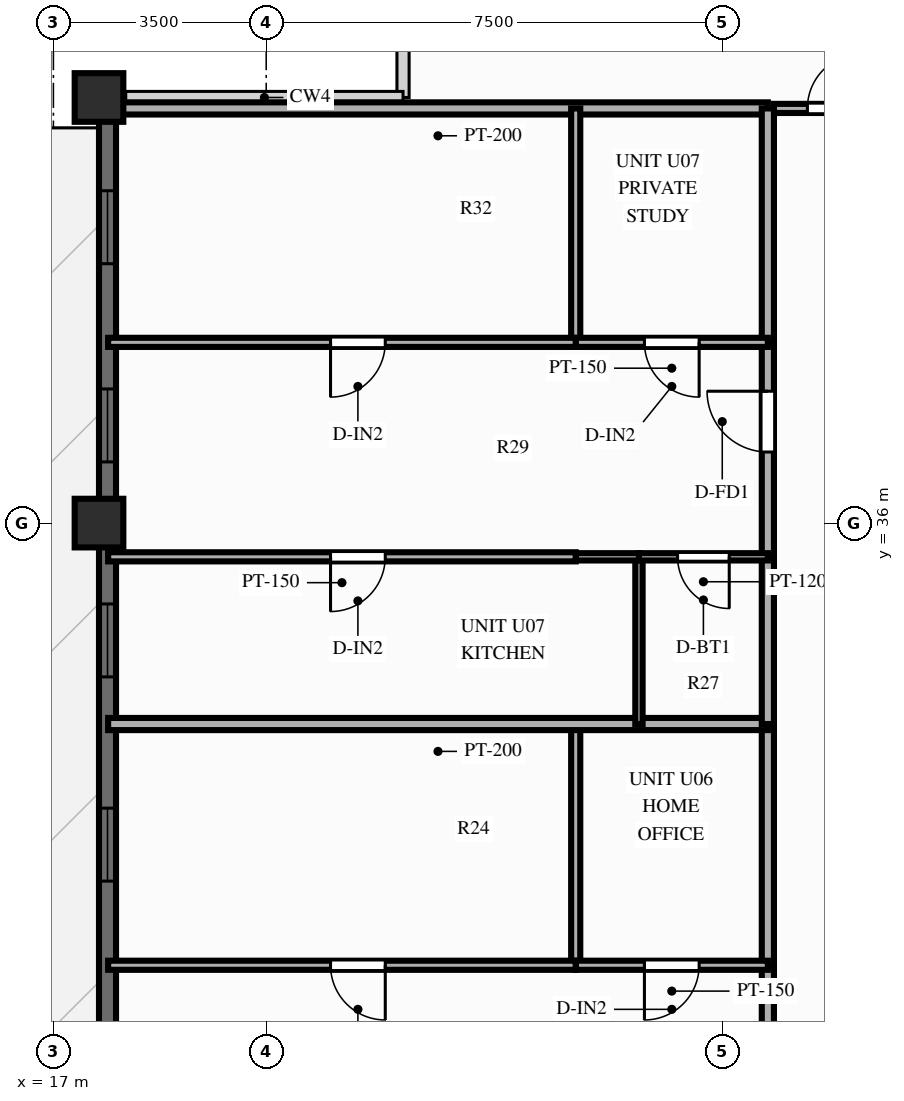
"""IFC4 building model, lengths in metres.
Left out: names, types, materials, properties, quantities, classifications, styles, units other than length and angle.
Written with IfcOpenShell. Run it as: python <this file> out.ifc"""

import sys

from ifc_helpers import new_model, si_unit, direction, frame, frame_2d, origin, origin_2d, place, context, subcontext, project, spatial, rectangle, extrude, source, transform, mapped, element, fill, save


model = new_model("IFC4")
c1 = context("Model", 3, precision=1e-05, world=origin(), true_north=direction((0.0, 1.0)))
c2 = subcontext(c1, "Body", "Model", "MODEL_VIEW")
j1 = project(units=[si_unit("LENGTHUNIT", "METRE"), si_unit("PLANEANGLEUNIT", "RADIAN")], contexts=[c1])
p1 = place(None, origin())
s1 = spatial("IfcSite", under=j1, at=p1, CompositionType="ELEMENT")
p2 = place(p1, origin())
s2 = spatial("IfcBuilding", under=s1, at=p2, CompositionType="ELEMENT")
p3 = place(p2, frame((0.0, 0.0, 176.8)))
s3 = spatial("IfcBuildingStorey", under=s2, at=p3, CompositionType="ELEMENT", Elevation=176.8)
m1 = source(origin(), c2, "Body", "SweptSolid", [
    extrude(rectangle(XDim=0.8, YDim=0.8, at=origin_2d()), origin(), (0.0, 0.0, 1.0), 3.0),
])
for number, where, z_axis, x_axis in (
    (1, (17.75, 43.0, 0.0), (0.0, 0.0, 1.0), (1.0, 0.0, 0.0)),
    (2, (17.75, 36.0, 0.0), (0.0, 0.0, 1.0), (1.0, 0.0, 0.0)),
):
    element("IfcColumn", number, at=place(p3, frame(where, z_axis=z_axis, x_axis=x_axis)), inside=s3, PredefinedType="COLUMN", context=c2, shape_type="MappedRepresentation", body=[
        mapped(m1, transform((0.0, 0.0, 0.0), scale=1.0)),
    ])
p4 = place(p3, frame((17.89, 11.0, 0.0), z_axis=(0.0, 0.0, 1.0), x_axis=(0.0, 1.0, 0.0)))
e3 = element("IfcWall", 3, at=p4, inside=s3, PredefinedType="SOLIDWALL", context=c2, shape_type="SweptSolid", body=[
    extrude(rectangle(XDim=32.0, YDim=0.28, at=frame_2d((16.0, 0.0))), origin(), (0.0, 0.0, 1.0), 2.28),
])
p5 = place(p4, frame((0.985, 0.0, 0.25)))
e4 = element("IfcOpeningElement", 4, at=p5, cuts=e3, PredefinedType="OPENING", context=c2, shape_type="SweptSolid", body=[
    extrude(rectangle(XDim=1.2, YDim=1.5, at=frame_2d((0.6, 0.75))), frame((0.0, 0.152, 0.0), z_axis=(0.0, -1.0, 0.0), x_axis=(1.0, 0.0, 0.0)), (0.0, 0.0, 1.0), 0.304),
])
p6 = place(p4, frame((4.245, 0.0, 0.25)))
e5 = element("IfcOpeningElement", 5, at=p6, cuts=e3, PredefinedType="OPENING", context=c2, shape_type="SweptSolid", body=[
    extrude(rectangle(XDim=1.2, YDim=1.5, at=frame_2d((0.6, 0.75))), frame((0.0, 0.152, 0.0), z_axis=(0.0, -1.0, 0.0), x_axis=(1.0, 0.0, 0.0)), (0.0, 0.0, 1.0), 0.304),
])
p7 = place(p4, frame((8.667, 0.0, 0.25)))
e6 = element("IfcOpeningElement", 6, at=p7, cuts=e3, PredefinedType="OPENING", context=c2, shape_type="SweptSolid", body=[
    extrude(rectangle(XDim=1.2, YDim=1.5, at=frame_2d((0.6, 0.75))), frame((0.0, 0.152, 0.0), z_axis=(0.0, -1.0, 0.0), x_axis=(1.0, 0.0, 0.0)), (0.0, 0.0, 1.0), 0.304),
])
p8 = place(p4, frame((12.029, 0.0, 0.25)))
e7 = element("IfcOpeningElement", 7, at=p8, cuts=e3, PredefinedType="OPENING", context=c2, shape_type="SweptSolid", body=[
    extrude(rectangle(XDim=1.2, YDim=1.5, at=frame_2d((0.6, 0.75))), frame((0.0, 0.152, 0.0), z_axis=(0.0, -1.0, 0.0), x_axis=(1.0, 0.0, 0.0)), (0.0, 0.0, 1.0), 0.304),
])
p9 = place(p4, frame((15.066, 0.0, 0.0)))
e8 = element("IfcOpeningElement", 8, at=p9, cuts=e3, PredefinedType="OPENING", context=c2, shape_type="SweptSolid", body=[
    extrude(rectangle(XDim=1.6, YDim=2.15, at=frame_2d((0.8, 1.075))), frame((0.0, 0.152, 0.0), z_axis=(0.0, -1.0, 0.0), x_axis=(1.0, 0.0, 0.0)), (0.0, 0.0, 1.0), 0.304),
])
p10 = place(p4, frame((19.111, 0.0, 0.25)))
e9 = element("IfcOpeningElement", 9, at=p10, cuts=e3, PredefinedType="OPENING", context=c2, shape_type="SweptSolid", body=[
    extrude(rectangle(XDim=1.2, YDim=1.5, at=frame_2d((0.6, 0.75))), frame((0.0, 0.152, 0.0), z_axis=(0.0, -1.0, 0.0), x_axis=(1.0, 0.0, 0.0)), (0.0, 0.0, 1.0), 0.304),
])
p11 = place(p4, frame((22.47, 0.0, 0.25)))
e10 = element("IfcOpeningElement", 10, at=p11, cuts=e3, PredefinedType="OPENING", context=c2, shape_type="SweptSolid", body=[
    extrude(rectangle(XDim=1.2, YDim=1.5, at=frame_2d((0.6, 0.75))), frame((0.0, 0.152, 0.0), z_axis=(0.0, -1.0, 0.0), x_axis=(1.0, 0.0, 0.0)), (0.0, 0.0, 1.0), 0.304),
])
p12 = place(p4, frame((26.006, 0.0, 0.25)))
e11 = element("IfcOpeningElement", 11, at=p12, cuts=e3, PredefinedType="OPENING", context=c2, shape_type="SweptSolid", body=[
    extrude(rectangle(XDim=1.2, YDim=1.5, at=frame_2d((0.6, 0.75))), frame((0.0, 0.152, 0.0), z_axis=(0.0, -1.0, 0.0), x_axis=(1.0, 0.0, 0.0)), (0.0, 0.0, 1.0), 0.304),
])
p13 = place(p4, frame((29.266, 0.0, 0.25)))
e12 = element("IfcOpeningElement", 12, at=p13, cuts=e3, PredefinedType="OPENING", context=c2, shape_type="SweptSolid", body=[
    extrude(rectangle(XDim=1.2, YDim=1.5, at=frame_2d((0.6, 0.75))), frame((0.0, 0.152, 0.0), z_axis=(0.0, -1.0, 0.0), x_axis=(1.0, 0.0, 0.0)), (0.0, 0.0, 1.0), 0.304),
])
p14 = place(p3, frame((28.85, 42.82, 0.0), z_axis=(0.0, 0.0, 1.0), x_axis=(1.0, 0.0, 0.0)))
e13 = element("IfcWall", 13, at=p14, inside=s3, PredefinedType="PARTITIONING", context=c2, shape_type="SweptSolid", body=[
    extrude(rectangle(XDim=2.33, YDim=0.15, at=frame_2d((1.165, 0.0))), origin(), (0.0, 0.0, 1.0), 2.79),
])
p15 = place(p14, frame((0.55, 0.0, 0.0)))
e14 = element("IfcOpeningElement", 14, at=p15, cuts=e13, PredefinedType="OPENING", context=c2, shape_type="SweptSolid", body=[
    extrude(rectangle(XDim=0.9, YDim=2.1, at=frame_2d((0.45, 1.05))), frame((0.0, 0.087, 0.0), z_axis=(0.0, -1.0, 0.0), x_axis=(1.0, 0.0, 0.0)), (0.0, 0.0, 1.0), 0.174),
])
p16 = place(p3, frame((28.75, 42.82, 0.0), z_axis=(0.0, 0.0, 1.0), x_axis=(-1.0, 0.0, 0.0)))
e15 = element("IfcWall", 15, at=p16, inside=s3, PredefinedType="PARTITIONING", context=c2, shape_type="SweptSolid", body=[
    extrude(rectangle(XDim=10.85, YDim=0.2, at=frame_2d((5.425, 0.0))), origin(), (0.0, 0.0, 1.0), 2.79),
])
p17 = place(p3, frame((28.75, 25.004, 0.0), z_axis=(0.0, 0.0, 1.0), x_axis=(0.0, 1.0, 0.0)))
e16 = element("IfcWall", 16, at=p17, inside=s3, PredefinedType="PARTITIONING", context=c2, shape_type="SweptSolid", body=[
    extrude(rectangle(XDim=3.724, YDim=0.2, at=frame_2d((1.862, 0.0))), origin(), (0.0, 0.0, 1.0), 2.79),
])
p18 = place(p17, frame((1.362, 0.0, 0.0)))
e17 = element("IfcOpeningElement", 17, at=p18, cuts=e16, PredefinedType="OPENING", context=c2, shape_type="SweptSolid", body=[
    extrude(rectangle(XDim=1.0, YDim=2.15, at=frame_2d((0.5, 1.075))), frame((0.0, 0.112, 0.0), z_axis=(0.0, -1.0, 0.0), x_axis=(1.0, 0.0, 0.0)), (0.0, 0.0, 1.0), 0.224),
])
p19 = place(p3, frame((28.75, 28.728, 0.0), z_axis=(0.0, 0.0, 1.0), x_axis=(0.0, 1.0, 0.0)))
e18 = element("IfcWall", 18, at=p19, inside=s3, PredefinedType="PARTITIONING", context=c2, shape_type="SweptSolid", body=[
    extrude(rectangle(XDim=3.968, YDim=0.2, at=frame_2d((1.984, 0.0))), origin(), (0.0, 0.0, 1.0), 2.79),
])
p20 = place(p3, frame((25.59, 28.728, 0.0), z_axis=(0.0, 0.0, 1.0), x_axis=(0.0, 1.0, 0.0)))
e19 = element("IfcWall", 19, at=p20, inside=s3, PredefinedType="PARTITIONING", context=c2, shape_type="SweptSolid", body=[
    extrude(rectangle(XDim=3.968, YDim=0.15, at=frame_2d((1.984, 0.0))), origin(), (0.0, 0.0, 1.0), 2.79),
])
p21 = place(p3, frame((28.75, 28.728, 0.0), z_axis=(0.0, 0.0, 1.0), x_axis=(-1.0, 0.0, 0.0)))
e20 = element("IfcWall", 20, at=p21, inside=s3, PredefinedType="PARTITIONING", context=c2, shape_type="SweptSolid", body=[
    extrude(rectangle(XDim=3.16, YDim=0.15, at=frame_2d((1.58, 0.0))), origin(), (0.0, 0.0, 1.0), 2.79),
])
p22 = place(p21, frame((1.13, 0.0, 0.0)))
e21 = element("IfcOpeningElement", 21, at=p22, cuts=e20, PredefinedType="OPENING", context=c2, shape_type="SweptSolid", body=[
    extrude(rectangle(XDim=0.9, YDim=2.1, at=frame_2d((0.45, 1.05))), frame((0.0, 0.087, 0.0), z_axis=(0.0, -1.0, 0.0), x_axis=(1.0, 0.0, 0.0)), (0.0, 0.0, 1.0), 0.174),
])
p23 = place(p3, frame((25.59, 28.728, 0.0), z_axis=(0.0, 0.0, 1.0), x_axis=(-1.0, 0.0, 0.0)))
e22 = element("IfcWall", 22, at=p23, inside=s3, PredefinedType="PARTITIONING", context=c2, shape_type="SweptSolid", body=[
    extrude(rectangle(XDim=7.69, YDim=0.15, at=frame_2d((3.845, 0.0))), origin(), (0.0, 0.0, 1.0), 2.79),
])
p24 = place(p23, frame((3.132, 0.0, 0.0)))
e23 = element("IfcOpeningElement", 23, at=p24, cuts=e22, PredefinedType="OPENING", context=c2, shape_type="SweptSolid", body=[
    extrude(rectangle(XDim=0.9, YDim=2.1, at=frame_2d((0.45, 1.05))), frame((0.0, 0.087, 0.0), z_axis=(0.0, -1.0, 0.0), x_axis=(1.0, 0.0, 0.0)), (0.0, 0.0, 1.0), 0.174),
])
p25 = place(p3, frame((28.75, 32.695, 0.0), z_axis=(0.0, 0.0, 1.0), x_axis=(-1.0, 0.0, 0.0)))
e24 = element("IfcWall", 24, at=p25, inside=s3, PredefinedType="PARTITIONING", context=c2, shape_type="SweptSolid", body=[
    extrude(rectangle(XDim=10.85, YDim=0.2, at=frame_2d((5.425, 0.0))), origin(), (0.0, 0.0, 1.0), 2.79),
])
p26 = place(p3, frame((28.75, 32.695, 0.0), z_axis=(0.0, 0.0, 1.0), x_axis=(0.0, 1.0, 0.0)))
e25 = element("IfcWall", 25, at=p26, inside=s3, PredefinedType="PARTITIONING", context=c2, shape_type="SweptSolid", body=[
    extrude(rectangle(XDim=2.75, YDim=0.2, at=frame_2d((1.375, 0.0))), origin(), (0.0, 0.0, 1.0), 2.79),
])
p27 = place(p3, frame((28.75, 35.445, 0.0), z_axis=(0.0, 0.0, 1.0), x_axis=(0.0, 1.0, 0.0)))
e26 = element("IfcWall", 26, at=p27, inside=s3, PredefinedType="PARTITIONING", context=c2, shape_type="SweptSolid", body=[
    extrude(rectangle(XDim=3.527, YDim=0.2, at=frame_2d((1.764, 0.0))), origin(), (0.0, 0.0, 1.0), 2.79),
])
p28 = place(p27, frame((1.724, 0.0, 0.0)))
e27 = element("IfcOpeningElement", 27, at=p28, cuts=e26, PredefinedType="OPENING", context=c2, shape_type="SweptSolid", body=[
    extrude(rectangle(XDim=1.0, YDim=2.15, at=frame_2d((0.5, 1.075))), frame((0.0, 0.112, 0.0), z_axis=(0.0, -1.0, 0.0), x_axis=(1.0, 0.0, 0.0)), (0.0, 0.0, 1.0), 0.224),
])
p29 = place(p3, frame((28.75, 38.973, 0.0), z_axis=(0.0, 0.0, 1.0), x_axis=(0.0, 1.0, 0.0)))
e28 = element("IfcWall", 28, at=p29, inside=s3, PredefinedType="PARTITIONING", context=c2, shape_type="SweptSolid", body=[
    extrude(rectangle(XDim=3.847, YDim=0.2, at=frame_2d((1.924, 0.0))), origin(), (0.0, 0.0, 1.0), 2.79),
])
p30 = place(p3, frame((26.63, 32.695, 0.0), z_axis=(0.0, 0.0, 1.0), x_axis=(0.0, 1.0, 0.0)))
e29 = element("IfcWall", 29, at=p30, inside=s3, PredefinedType="PARTITIONING", context=c2, shape_type="SweptSolid", body=[
    extrude(rectangle(XDim=2.75, YDim=0.12, at=frame_2d((1.375, 0.0))), origin(), (0.0, 0.0, 1.0), 2.79),
])
p31 = place(p3, frame((25.59, 38.973, 0.0), z_axis=(0.0, 0.0, 1.0), x_axis=(0.0, 1.0, 0.0)))
e30 = element("IfcWall", 30, at=p31, inside=s3, PredefinedType="PARTITIONING", context=c2, shape_type="SweptSolid", body=[
    extrude(rectangle(XDim=3.847, YDim=0.15, at=frame_2d((1.924, 0.0))), origin(), (0.0, 0.0, 1.0), 2.79),
])
p32 = place(p3, frame((28.75, 35.445, 0.0), z_axis=(0.0, 0.0, 1.0), x_axis=(-1.0, 0.0, 0.0)))
e31 = element("IfcWall", 31, at=p32, inside=s3, PredefinedType="PARTITIONING", context=c2, shape_type="SweptSolid", body=[
    extrude(rectangle(XDim=2.12, YDim=0.12, at=frame_2d((1.06, 0.0))), origin(), (0.0, 0.0, 1.0), 2.79),
])
p33 = place(p32, frame((0.635, 0.0, 0.0)))
e32 = element("IfcOpeningElement", 32, at=p33, cuts=e31, PredefinedType="OPENING", context=c2, shape_type="SweptSolid", body=[
    extrude(rectangle(XDim=0.85, YDim=2.05, at=frame_2d((0.425, 1.025))), frame((0.0, 0.072, 0.0), z_axis=(0.0, -1.0, 0.0), x_axis=(1.0, 0.0, 0.0)), (0.0, 0.0, 1.0), 0.144),
])
p34 = place(p3, frame((26.63, 35.445, 0.0), z_axis=(0.0, 0.0, 1.0), x_axis=(-1.0, 0.0, 0.0)))
e33 = element("IfcWall", 33, at=p34, inside=s3, PredefinedType="PARTITIONING", context=c2, shape_type="SweptSolid", body=[
    extrude(rectangle(XDim=1.04, YDim=0.12, at=frame_2d((0.52, 0.0))), origin(), (0.0, 0.0, 1.0), 2.79),
])
p35 = place(p3, frame((25.59, 35.445, 0.0), z_axis=(0.0, 0.0, 1.0), x_axis=(-1.0, 0.0, 0.0)))
e34 = element("IfcWall", 34, at=p35, inside=s3, PredefinedType="PARTITIONING", context=c2, shape_type="SweptSolid", body=[
    extrude(rectangle(XDim=7.69, YDim=0.15, at=frame_2d((3.845, 0.0))), origin(), (0.0, 0.0, 1.0), 2.79),
])
p36 = place(p35, frame((3.132, 0.0, 0.0)))
e35 = element("IfcOpeningElement", 35, at=p36, cuts=e34, PredefinedType="OPENING", context=c2, shape_type="SweptSolid", body=[
    extrude(rectangle(XDim=0.9, YDim=2.1, at=frame_2d((0.45, 1.05))), frame((0.0, 0.087, 0.0), z_axis=(0.0, -1.0, 0.0), x_axis=(1.0, 0.0, 0.0)), (0.0, 0.0, 1.0), 0.174),
])
p37 = place(p3, frame((28.75, 38.973, 0.0), z_axis=(0.0, 0.0, 1.0), x_axis=(-1.0, 0.0, 0.0)))
e36 = element("IfcWall", 36, at=p37, inside=s3, PredefinedType="PARTITIONING", context=c2, shape_type="SweptSolid", body=[
    extrude(rectangle(XDim=3.16, YDim=0.15, at=frame_2d((1.58, 0.0))), origin(), (0.0, 0.0, 1.0), 2.79),
])
p38 = place(p37, frame((1.13, 0.0, 0.0)))
e37 = element("IfcOpeningElement", 37, at=p38, cuts=e36, PredefinedType="OPENING", context=c2, shape_type="SweptSolid", body=[
    extrude(rectangle(XDim=0.9, YDim=2.1, at=frame_2d((0.45, 1.05))), frame((0.0, 0.087, 0.0), z_axis=(0.0, -1.0, 0.0), x_axis=(1.0, 0.0, 0.0)), (0.0, 0.0, 1.0), 0.174),
])
p39 = place(p3, frame((25.59, 38.973, 0.0), z_axis=(0.0, 0.0, 1.0), x_axis=(-1.0, 0.0, 0.0)))
e38 = element("IfcWall", 38, at=p39, inside=s3, PredefinedType="PARTITIONING", context=c2, shape_type="SweptSolid", body=[
    extrude(rectangle(XDim=7.69, YDim=0.15, at=frame_2d((3.845, 0.0))), origin(), (0.0, 0.0, 1.0), 2.79),
])
p40 = place(p39, frame((3.132, 0.0, 0.0)))
e39 = element("IfcOpeningElement", 39, at=p40, cuts=e38, PredefinedType="OPENING", context=c2, shape_type="SweptSolid", body=[
    extrude(rectangle(XDim=0.9, YDim=2.1, at=frame_2d((0.45, 1.05))), frame((0.0, 0.087, 0.0), z_axis=(0.0, -1.0, 0.0), x_axis=(1.0, 0.0, 0.0)), (0.0, 0.0, 1.0), 0.174),
])
m2 = source(origin(), c2, "Body", "SweptSolid", [
    extrude(rectangle(XDim=1.2, YDim=1.5, at=frame_2d((0.6, 0.75))), frame((0.0, 0.03, 0.0), z_axis=(0.0, -1.0, 0.0), x_axis=(1.0, 0.0, 0.0)), (0.0, 0.0, 1.0), 0.06),
])
p41 = place(p10, origin())
e40 = element("IfcWindow", 40, at=p41, inside=s3, PartitioningType="SINGLE_PANEL", PredefinedType="WINDOW", context=c2, shape_type="MappedRepresentation", body=[
    mapped(m2, transform((0.0, 0.0, 0.0), scale=1.0)),
])
fill(e9, e40)
p42 = place(p11, origin())
e41 = element("IfcWindow", 41, at=p42, inside=s3, PartitioningType="SINGLE_PANEL", PredefinedType="WINDOW", context=c2, shape_type="MappedRepresentation", body=[
    mapped(m2, transform((0.0, 0.0, 0.0), scale=1.0)),
])
fill(e10, e41)
p43 = place(p12, origin())
e42 = element("IfcWindow", 42, at=p43, inside=s3, PartitioningType="SINGLE_PANEL", PredefinedType="WINDOW", context=c2, shape_type="MappedRepresentation", body=[
    mapped(m2, transform((0.0, 0.0, 0.0), scale=1.0)),
])
fill(e11, e42)
p44 = place(p13, origin())
e43 = element("IfcWindow", 43, at=p44, inside=s3, PartitioningType="SINGLE_PANEL", PredefinedType="WINDOW", context=c2, shape_type="MappedRepresentation", body=[
    mapped(m2, transform((0.0, 0.0, 0.0), scale=1.0)),
])
fill(e12, e43)
m3 = source(origin(), c2, "Body", "SweptSolid", [
    extrude(rectangle(XDim=0.9, YDim=2.1, at=frame_2d((0.45, 1.05))), frame((0.0, 0.025, 0.0), z_axis=(0.0, -1.0, 0.0), x_axis=(1.0, 0.0, 0.0)), (0.0, 0.0, 1.0), 0.05),
])
p45 = place(p15, origin())
e44 = element("IfcDoor", 44, at=p45, inside=s3, OperationType="SINGLE_SWING_RIGHT", PredefinedType="DOOR", context=c2, shape_type="MappedRepresentation", body=[
    mapped(m3, transform((0.0, 0.0, 0.0), scale=1.0)),
])
fill(e14, e44)
p46 = place(p22, origin())
e45 = element("IfcDoor", 45, at=p46, inside=s3, OperationType="SINGLE_SWING_RIGHT", PredefinedType="DOOR", context=c2, shape_type="MappedRepresentation", body=[
    mapped(m3, transform((0.0, 0.0, 0.0), scale=1.0)),
])
fill(e21, e45)
p47 = place(p24, origin())
e46 = element("IfcDoor", 46, at=p47, inside=s3, OperationType="SINGLE_SWING_LEFT", PredefinedType="DOOR", context=c2, shape_type="MappedRepresentation", body=[
    mapped(m3, transform((0.0, 0.0, 0.0), scale=1.0)),
])
fill(e23, e46)
m4 = source(origin(), c2, "Body", "SweptSolid", [
    extrude(rectangle(XDim=1.0, YDim=2.15, at=frame_2d((0.5, 1.075))), frame((0.0, 0.025, 0.0), z_axis=(0.0, -1.0, 0.0), x_axis=(1.0, 0.0, 0.0)), (0.0, 0.0, 1.0), 0.05),
])
p48 = place(p28, origin())
e47 = element("IfcDoor", 47, at=p48, inside=s3, OperationType="SINGLE_SWING_RIGHT", PredefinedType="DOOR", context=c2, shape_type="MappedRepresentation", body=[
    mapped(m4, transform((0.0, 0.0, 0.0), scale=1.0)),
])
fill(e27, e47)
m5 = source(origin(), c2, "Body", "SweptSolid", [
    extrude(rectangle(XDim=0.85, YDim=2.05, at=frame_2d((0.425, 1.025))), frame((0.0, 0.025, 0.0), z_axis=(0.0, -1.0, 0.0), x_axis=(1.0, 0.0, 0.0)), (0.0, 0.0, 1.0), 0.05),
])
p49 = place(p33, origin())
e48 = element("IfcDoor", 48, at=p49, inside=s3, OperationType="SINGLE_SWING_LEFT", PredefinedType="DOOR", context=c2, shape_type="MappedRepresentation", body=[
    mapped(m5, transform((0.0, 0.0, 0.0), scale=1.0)),
])
fill(e32, e48)
p50 = place(p36, origin())
e49 = element("IfcDoor", 49, at=p50, inside=s3, OperationType="SINGLE_SWING_RIGHT", PredefinedType="DOOR", context=c2, shape_type="MappedRepresentation", body=[
    mapped(m3, transform((0.0, 0.0, 0.0), scale=1.0)),
])
fill(e35, e49)
p51 = place(p38, origin())
e50 = element("IfcDoor", 50, at=p51, inside=s3, OperationType="SINGLE_SWING_LEFT", PredefinedType="DOOR", context=c2, shape_type="MappedRepresentation", body=[
    mapped(m3, transform((0.0, 0.0, 0.0), scale=1.0)),
])
fill(e37, e50)
p52 = place(p40, origin())
e51 = element("IfcDoor", 51, at=p52, inside=s3, OperationType="SINGLE_SWING_RIGHT", PredefinedType="DOOR", context=c2, shape_type="MappedRepresentation", body=[
    mapped(m3, transform((0.0, 0.0, 0.0), scale=1.0)),
])
fill(e39, e51)
save(model, sys.argv[1])
